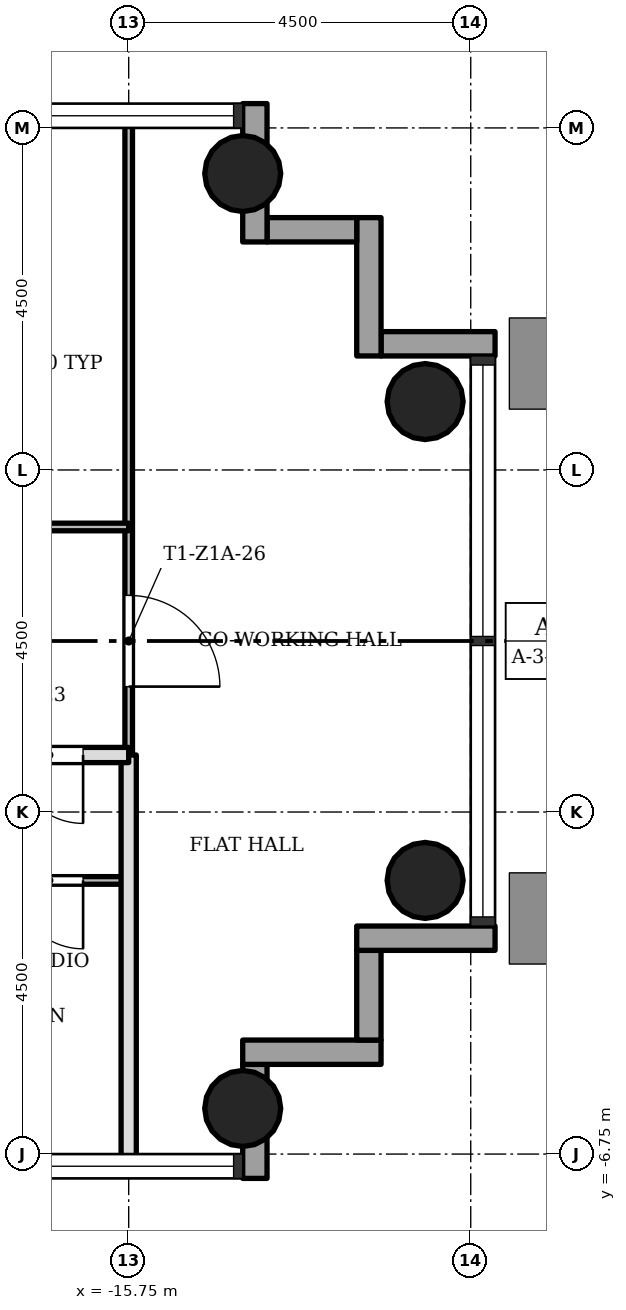
"""IFC4 building model, lengths in metres.
Left out: names, types, materials, properties, quantities, classifications, styles, units other than length and angle.
Written with IfcOpenShell. Run it as: python <this file> out.ifc"""

import sys

from ifc_helpers import new_model, si_unit, direction, frame, frame_2d, origin, origin_2d, place, context, subcontext, project, spatial, rectangle, hollow_circle, extrude, element, fill, save


model = new_model("IFC4")
c1 = context("Model", 3, precision=1e-05, world=origin(), true_north=direction((0.0, 1.0)))
c2 = subcontext(c1, "Body", "Model", "MODEL_VIEW")
j1 = project(units=[si_unit("LENGTHUNIT", "METRE"), si_unit("PLANEANGLEUNIT", "RADIAN")], contexts=[c1])
p1 = place(None, origin())
s1 = spatial("IfcSite", under=j1, at=p1, CompositionType="ELEMENT")
p2 = place(p1, origin())
s2 = spatial("IfcBuilding", under=s1, at=p2, CompositionType="ELEMENT")
p3 = place(p2, frame((0.0, 0.0, 31.3)))
s3 = spatial("IfcBuildingStorey", under=s2, at=p3, CompositionType="ELEMENT", Elevation=31.3)
for number, where, z_axis, x_axis in (
    (1, (-14.25, -6.15, 0.0), (0.0, 0.0, 1.0), (1.0, 0.0, 0.0)),
    (2, (-14.25, 6.15, 0.0), (0.0, 0.0, 1.0), (1.0, 0.0, 0.0)),
    (3, (-11.85, -3.15, 0.0), (0.0, 0.0, 1.0), (1.0, 0.0, 0.0)),
    (4, (-11.85, 3.15, 0.0), (0.0, 0.0, 1.0), (1.0, 0.0, 0.0)),
):
    element("IfcColumn", number, at=place(p3, frame(where, z_axis=z_axis, x_axis=x_axis)), inside=s3, PredefinedType="COLUMN", context=c2, shape_type="SweptSolid", body=[
        extrude(hollow_circle(Radius=0.5, WallThickness=0.036, at=origin_2d()), origin(), (0.0, 0.0, 1.0), 3.4),
    ])
p4 = place(p3, frame((-14.09, -7.07, -0.3), z_axis=(0.0, 0.0, 1.0), x_axis=(0.0, 1.0, 0.0)))
e5 = element("IfcWall", 5, at=p4, inside=s3, PredefinedType="STANDARD", context=c2, shape_type="SweptSolid", body=[
    extrude(rectangle(XDim=1.5, YDim=0.32, at=frame_2d((0.75, 0.0))), origin(), (0.0, 0.0, 1.0), 3.4),
])
p5 = place(p3, frame((-14.25, -5.41, -0.3), z_axis=(0.0, 0.0, 1.0), x_axis=(1.0, 0.0, 0.0)))
e6 = element("IfcWall", 6, at=p5, inside=s3, PredefinedType="STANDARD", context=c2, shape_type="SweptSolid", body=[
    extrude(rectangle(XDim=1.82, YDim=0.32, at=frame_2d((0.91, 0.0))), origin(), (0.0, 0.0, 1.0), 3.4),
])
p6 = place(p3, frame((-12.59, -5.25, -0.3), z_axis=(0.0, 0.0, 1.0), x_axis=(0.0, 1.0, 0.0)))
e7 = element("IfcWall", 7, at=p6, inside=s3, PredefinedType="STANDARD", context=c2, shape_type="SweptSolid", body=[
    extrude(rectangle(XDim=1.18, YDim=0.32, at=frame_2d((0.59, 0.0))), origin(), (0.0, 0.0, 1.0), 3.4),
])
p7 = place(p3, frame((-12.75, -3.91, -0.3), z_axis=(0.0, 0.0, 1.0), x_axis=(1.0, 0.0, 0.0)))
e8 = element("IfcWall", 8, at=p7, inside=s3, PredefinedType="STANDARD", context=c2, shape_type="SweptSolid", body=[
    extrude(rectangle(XDim=1.82, YDim=0.32, at=frame_2d((0.91, 0.0))), origin(), (0.0, 0.0, 1.0), 3.4),
])
p8 = place(p3, frame((-10.93, 3.91, -0.3), z_axis=(0.0, 0.0, 1.0), x_axis=(-1.0, 0.0, 0.0)))
e9 = element("IfcWall", 9, at=p8, inside=s3, PredefinedType="STANDARD", context=c2, shape_type="SweptSolid", body=[
    extrude(rectangle(XDim=1.5, YDim=0.32, at=frame_2d((0.75, 0.0))), origin(), (0.0, 0.0, 1.0), 3.4),
])
p9 = place(p3, frame((-12.59, 3.75, -0.3), z_axis=(0.0, 0.0, 1.0), x_axis=(0.0, 1.0, 0.0)))
e10 = element("IfcWall", 10, at=p9, inside=s3, PredefinedType="STANDARD", context=c2, shape_type="SweptSolid", body=[
    extrude(rectangle(XDim=1.82, YDim=0.32, at=frame_2d((0.91, 0.0))), origin(), (0.0, 0.0, 1.0), 3.4),
])
p10 = place(p3, frame((-12.75, 5.41, -0.3), z_axis=(0.0, 0.0, 1.0), x_axis=(-1.0, 0.0, 0.0)))
e11 = element("IfcWall", 11, at=p10, inside=s3, PredefinedType="STANDARD", context=c2, shape_type="SweptSolid", body=[
    extrude(rectangle(XDim=1.18, YDim=0.32, at=frame_2d((0.59, 0.0))), origin(), (0.0, 0.0, 1.0), 3.4),
])
p11 = place(p3, frame((-14.09, 5.25, -0.3), z_axis=(0.0, 0.0, 1.0), x_axis=(0.0, 1.0, 0.0)))
e12 = element("IfcWall", 12, at=p11, inside=s3, PredefinedType="STANDARD", context=c2, shape_type="SweptSolid", body=[
    extrude(rectangle(XDim=1.82, YDim=0.32, at=frame_2d((0.91, 0.0))), origin(), (0.0, 0.0, 1.0), 3.4),
])
p12 = place(p3, frame((-15.75, -1.5, 0.0), z_axis=(0.0, 0.0, 1.0), x_axis=(0.0, 1.0, 0.0)))
e13 = element("IfcWall", 13, at=p12, inside=s3, PredefinedType="PARTITIONING", context=c2, shape_type="SweptSolid", body=[
    extrude(rectangle(XDim=8.35, YDim=0.1, at=frame_2d((4.175, 0.0))), origin(), (0.0, 0.0, 1.0), 3.0),
])
p13 = place(p12, frame((0.9, 0.0, 0.0)))
e14 = element("IfcOpeningElement", 14, at=p13, cuts=e13, PredefinedType="OPENING", context=c2, shape_type="SweptSolid", body=[
    extrude(rectangle(XDim=1.2, YDim=2.1, at=frame_2d((0.6, 1.05))), frame((0.0, 0.06, 0.0), z_axis=(0.0, -1.0, 0.0), x_axis=(1.0, 0.0, 0.0)), (0.0, 0.0, 1.0), 0.12),
])
p14 = place(p3, frame((-15.75, -6.85, 0.0), z_axis=(0.0, 0.0, 1.0), x_axis=(0.0, 1.0, 0.0)))
e15 = element("IfcWall", 15, at=p14, inside=s3, PredefinedType="SOLIDWALL", context=c2, shape_type="SweptSolid", body=[
    extrude(rectangle(XDim=5.35, YDim=0.2, at=frame_2d((2.675, 0.0))), origin(), (0.0, 0.0, 1.0), 3.0),
])
p15 = place(p3, frame((-20.25, -3.15, 0.0), z_axis=(0.0, 0.0, 1.0), x_axis=(1.0, 0.0, 0.0)))
e16 = element("IfcWall", 16, at=p15, inside=s3, PredefinedType="PARTITIONING", context=c2, shape_type="SweptSolid", body=[
    extrude(rectangle(XDim=4.5, YDim=0.1, at=frame_2d((2.25, 0.0))), origin(), (0.0, 0.0, 1.0), 3.0),
])
p16 = place(p15, frame((3.0, 0.0, 0.0)))
e17 = element("IfcOpeningElement", 17, at=p16, cuts=e16, PredefinedType="OPENING", context=c2, shape_type="SweptSolid", body=[
    extrude(rectangle(XDim=0.9, YDim=2.1, at=frame_2d((0.45, 1.05))), frame((0.0, 0.06, 0.0), z_axis=(0.0, -1.0, 0.0), x_axis=(1.0, 0.0, 0.0)), (0.0, 0.0, 1.0), 0.12),
])
p17 = place(p3, frame((-20.25, -1.5, 0.0), z_axis=(0.0, 0.0, 1.0), x_axis=(1.0, 0.0, 0.0)))
e18 = element("IfcWall", 18, at=p17, inside=s3, PredefinedType="SOLIDWALL", context=c2, shape_type="SweptSolid", body=[
    extrude(rectangle(XDim=4.5, YDim=0.2, at=frame_2d((2.25, 0.0))), origin(), (0.0, 0.0, 1.0), 3.0),
])
p18 = place(p17, frame((3.0, 0.0, 0.0)))
e19 = element("IfcOpeningElement", 19, at=p18, cuts=e18, PredefinedType="OPENING", context=c2, shape_type="SweptSolid", body=[
    extrude(rectangle(XDim=0.9, YDim=2.1, at=frame_2d((0.45, 1.05))), frame((0.0, 0.11, 0.0), z_axis=(0.0, -1.0, 0.0), x_axis=(1.0, 0.0, 0.0)), (0.0, 0.0, 1.0), 0.22),
])
p19 = place(p3, frame((-20.25, 1.5, 0.0), z_axis=(0.0, 0.0, 1.0), x_axis=(1.0, 0.0, 0.0)))
e20 = element("IfcWall", 20, at=p19, inside=s3, PredefinedType="PARTITIONING", context=c2, shape_type="SweptSolid", body=[
    extrude(rectangle(XDim=4.5, YDim=0.1, at=frame_2d((2.25, 0.0))), origin(), (0.0, 0.0, 1.0), 3.0),
])
p20 = place(p19, frame((1.8, 0.0, 0.0)))
e21 = element("IfcOpeningElement", 21, at=p20, cuts=e20, PredefinedType="OPENING", context=c2, shape_type="SweptSolid", body=[
    extrude(rectangle(XDim=0.9, YDim=2.1, at=frame_2d((0.45, 1.05))), frame((0.0, 0.06, 0.0), z_axis=(0.0, -1.0, 0.0), x_axis=(1.0, 0.0, 0.0)), (0.0, 0.0, 1.0), 0.12),
])
p21 = place(p18, origin())
e22 = element("IfcDoor", 22, at=p21, inside=s3, OperationType="SINGLE_SWING_RIGHT", PredefinedType="DOOR", context=c2, shape_type="SweptSolid", body=[
    extrude(rectangle(XDim=0.9, YDim=2.1, at=frame_2d((0.45, 1.05))), frame((0.0, 0.025, 0.0), z_axis=(0.0, -1.0, 0.0), x_axis=(1.0, 0.0, 0.0)), (0.0, 0.0, 1.0), 0.05),
])
fill(e19, e22)
p22 = place(p16, origin())
e23 = element("IfcDoor", 23, at=p22, inside=s3, OperationType="SINGLE_SWING_RIGHT", PredefinedType="DOOR", context=c2, shape_type="SweptSolid", body=[
    extrude(rectangle(XDim=0.9, YDim=2.1, at=frame_2d((0.45, 1.05))), frame((0.0, 0.025, 0.0), z_axis=(0.0, -1.0, 0.0), x_axis=(1.0, 0.0, 0.0)), (0.0, 0.0, 1.0), 0.05),
])
fill(e17, e23)
p23 = place(p13, origin())
e24 = element("IfcDoor", 24, at=p23, inside=s3, OperationType="SINGLE_SWING_LEFT", PredefinedType="DOOR", context=c2, shape_type="SweptSolid", body=[
    extrude(rectangle(XDim=1.2, YDim=2.1, at=frame_2d((0.6, 1.05))), frame((0.0, 0.025, 0.0), z_axis=(0.0, -1.0, 0.0), x_axis=(1.0, 0.0, 0.0)), (0.0, 0.0, 1.0), 0.05),
])
fill(e14, e24)
save(model, sys.argv[1])
